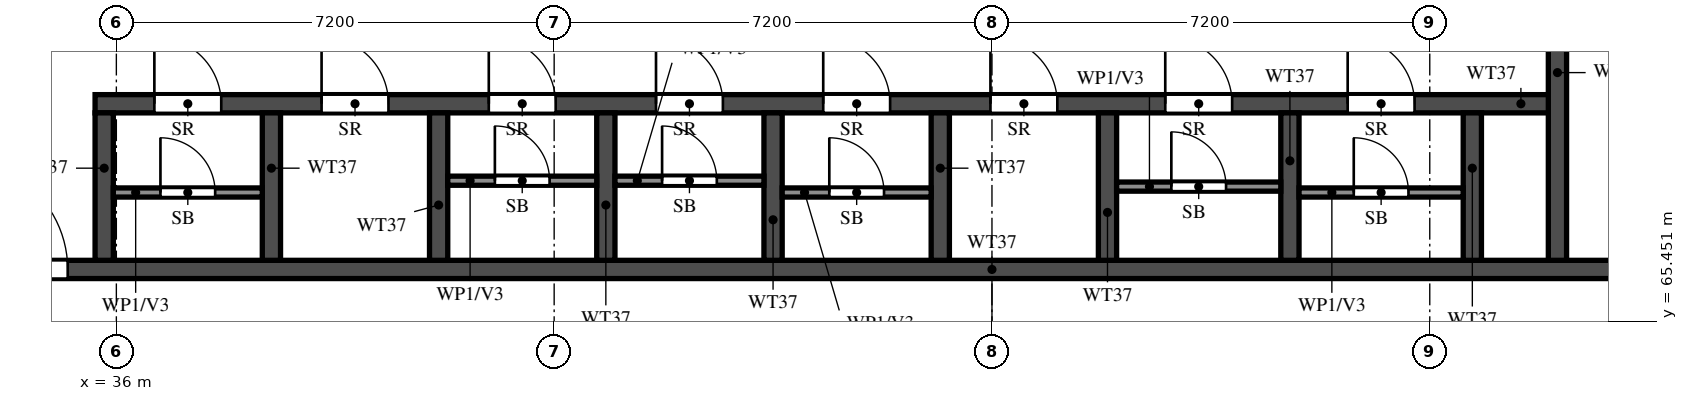
"""IFC4 building model, lengths in metres.
Left out: names, types, materials, properties, quantities, classifications, styles, units other than length and angle.
Written with IfcOpenShell. Run it as: python <this file> out.ifc"""

import sys

from ifc_helpers import new_model, si_unit, direction, frame, frame_2d, origin, place, context, subcontext, project, spatial, rectangle, extrude, element, fill, save


model = new_model("IFC4")
c1 = context("Model", 3, precision=1e-05, world=origin(), true_north=direction((0.0, 1.0)))
c2 = subcontext(c1, "Body", "Model", "MODEL_VIEW")
j1 = project(units=[si_unit("LENGTHUNIT", "METRE"), si_unit("PLANEANGLEUNIT", "RADIAN")], contexts=[c1])
p1 = place(None, origin())
s1 = spatial("IfcSite", under=j1, at=p1, CompositionType="ELEMENT")
p2 = place(p1, origin())
s2 = spatial("IfcBuilding", under=s1, at=p2, CompositionType="ELEMENT")
p3 = place(p2, frame((0.0, 0.0, 264.0)))
s3 = spatial("IfcBuildingStorey", under=s2, at=p3, CompositionType="ELEMENT", Elevation=264.0)
p4 = place(p3, frame((29.2, 66.3, 0.0), z_axis=(0.0, 0.0, 1.0), x_axis=(1.0, 0.0, 0.0)))
e1 = element("IfcWall", 1, at=p4, inside=s3, PredefinedType="SHEAR", context=c2, shape_type="SweptSolid", body=[
    extrude(rectangle(XDim=42.4, YDim=0.3, at=frame_2d((21.2, 0.0))), origin(), (0.0, 0.0, 1.0), 3.22),
])
p5 = place(p4, frame((1.425, 0.0, 0.0)))
e2 = element("IfcOpeningElement", 2, at=p5, cuts=e1, PredefinedType="OPENING", context=c2, shape_type="SweptSolid", body=[
    extrude(rectangle(XDim=1.1, YDim=2.1, at=frame_2d((0.55, 1.05))), frame((0.0, 0.16, 0.0), z_axis=(0.0, -1.0, 0.0), x_axis=(1.0, 0.0, 0.0)), (0.0, 0.0, 1.0), 0.32),
])
p6 = place(p4, frame((4.2, 0.0, 0.0)))
e3 = element("IfcOpeningElement", 3, at=p6, cuts=e1, PredefinedType="OPENING", context=c2, shape_type="SweptSolid", body=[
    extrude(rectangle(XDim=1.8, YDim=2.1, at=frame_2d((0.9, 1.05))), frame((0.0, 0.16, 0.0), z_axis=(0.0, -1.0, 0.0), x_axis=(1.0, 0.0, 0.0)), (0.0, 0.0, 1.0), 0.32),
])
p7 = place(p3, frame((35.65, 69.025, 0.0), z_axis=(0.0, 0.0, 1.0), x_axis=(1.0, 0.0, 0.0)))
e4 = element("IfcWall", 4, at=p7, inside=s3, PredefinedType="SHEAR", context=c2, shape_type="SweptSolid", body=[
    extrude(rectangle(XDim=24.05, YDim=0.3, at=frame_2d((12.025, 0.0))), origin(), (0.0, 0.0, 1.0), 3.22),
])
p8 = place(p7, frame((0.975, 0.0, 0.0)))
e5 = element("IfcOpeningElement", 5, at=p8, cuts=e4, PredefinedType="OPENING", context=c2, shape_type="SweptSolid", body=[
    extrude(rectangle(XDim=1.1, YDim=2.1, at=frame_2d((0.55, 1.05))), frame((0.0, 0.16, 0.0), z_axis=(0.0, -1.0, 0.0), x_axis=(1.0, 0.0, 0.0)), (0.0, 0.0, 1.0), 0.32),
])
p9 = place(p7, frame((3.725, 0.0, 0.0)))
e6 = element("IfcOpeningElement", 6, at=p9, cuts=e4, PredefinedType="OPENING", context=c2, shape_type="SweptSolid", body=[
    extrude(rectangle(XDim=1.1, YDim=2.1, at=frame_2d((0.55, 1.05))), frame((0.0, 0.16, 0.0), z_axis=(0.0, -1.0, 0.0), x_axis=(1.0, 0.0, 0.0)), (0.0, 0.0, 1.0), 0.32),
])
p10 = place(p7, frame((6.475, 0.0, 0.0)))
e7 = element("IfcOpeningElement", 7, at=p10, cuts=e4, PredefinedType="OPENING", context=c2, shape_type="SweptSolid", body=[
    extrude(rectangle(XDim=1.1, YDim=2.1, at=frame_2d((0.55, 1.05))), frame((0.0, 0.16, 0.0), z_axis=(0.0, -1.0, 0.0), x_axis=(1.0, 0.0, 0.0)), (0.0, 0.0, 1.0), 0.32),
])
p11 = place(p7, frame((9.225, 0.0, 0.0)))
e8 = element("IfcOpeningElement", 8, at=p11, cuts=e4, PredefinedType="OPENING", context=c2, shape_type="SweptSolid", body=[
    extrude(rectangle(XDim=1.1, YDim=2.1, at=frame_2d((0.55, 1.05))), frame((0.0, 0.16, 0.0), z_axis=(0.0, -1.0, 0.0), x_axis=(1.0, 0.0, 0.0)), (0.0, 0.0, 1.0), 0.32),
])
p12 = place(p7, frame((11.975, 0.0, 0.0)))
e9 = element("IfcOpeningElement", 9, at=p12, cuts=e4, PredefinedType="OPENING", context=c2, shape_type="SweptSolid", body=[
    extrude(rectangle(XDim=1.1, YDim=2.1, at=frame_2d((0.55, 1.05))), frame((0.0, 0.16, 0.0), z_axis=(0.0, -1.0, 0.0), x_axis=(1.0, 0.0, 0.0)), (0.0, 0.0, 1.0), 0.32),
])
p13 = place(p7, frame((14.725, 0.0, 0.0)))
e10 = element("IfcOpeningElement", 10, at=p13, cuts=e4, PredefinedType="OPENING", context=c2, shape_type="SweptSolid", body=[
    extrude(rectangle(XDim=1.1, YDim=2.1, at=frame_2d((0.55, 1.05))), frame((0.0, 0.16, 0.0), z_axis=(0.0, -1.0, 0.0), x_axis=(1.0, 0.0, 0.0)), (0.0, 0.0, 1.0), 0.32),
])
p14 = place(p7, frame((17.6, 0.0, 0.0)))
e11 = element("IfcOpeningElement", 11, at=p14, cuts=e4, PredefinedType="OPENING", context=c2, shape_type="SweptSolid", body=[
    extrude(rectangle(XDim=1.1, YDim=2.1, at=frame_2d((0.55, 1.05))), frame((0.0, 0.16, 0.0), z_axis=(0.0, -1.0, 0.0), x_axis=(1.0, 0.0, 0.0)), (0.0, 0.0, 1.0), 0.32),
])
p15 = place(p7, frame((20.6, 0.0, 0.0)))
e12 = element("IfcOpeningElement", 12, at=p15, cuts=e4, PredefinedType="OPENING", context=c2, shape_type="SweptSolid", body=[
    extrude(rectangle(XDim=1.1, YDim=2.1, at=frame_2d((0.55, 1.05))), frame((0.0, 0.16, 0.0), z_axis=(0.0, -1.0, 0.0), x_axis=(1.0, 0.0, 0.0)), (0.0, 0.0, 1.0), 0.32),
])
p16 = place(p3, frame((59.7, 66.45, 0.0), z_axis=(0.0, 0.0, 1.0), x_axis=(0.0, 1.0, 0.0)))
e13 = element("IfcWall", 13, at=p16, inside=s3, PredefinedType="SHEAR", context=c2, shape_type="SweptSolid", body=[
    extrude(rectangle(XDim=6.175, YDim=0.3, at=frame_2d((3.087, 0.0))), origin(), (0.0, 0.0, 1.0), 3.22),
])
p17 = place(p16, frame((3.85, 0.0, 0.0)))
e14 = element("IfcOpeningElement", 14, at=p17, cuts=e13, PredefinedType="OPENING", context=c2, shape_type="SweptSolid", body=[
    extrude(rectangle(XDim=1.2, YDim=2.1, at=frame_2d((0.6, 1.05))), frame((0.0, 0.16, 0.0), z_axis=(0.0, -1.0, 0.0), x_axis=(1.0, 0.0, 0.0)), (0.0, 0.0, 1.0), 0.32),
])
for number, where, z_axis, x_axis in (
    (15, (35.8, 66.45, 0.0), (0.0, 0.0, 1.0), (0.0, 1.0, 0.0)),
    (16, (38.55, 66.45, 0.0), (0.0, 0.0, 1.0), (0.0, 1.0, 0.0)),
    (17, (41.3, 66.45, 0.0), (0.0, 0.0, 1.0), (0.0, 1.0, 0.0)),
    (18, (44.05, 66.45, 0.0), (0.0, 0.0, 1.0), (0.0, 1.0, 0.0)),
    (19, (46.8, 66.45, 0.0), (0.0, 0.0, 1.0), (0.0, 1.0, 0.0)),
    (20, (49.55, 66.45, 0.0), (0.0, 0.0, 1.0), (0.0, 1.0, 0.0)),
    (21, (52.3, 66.45, 0.0), (0.0, 0.0, 1.0), (0.0, 1.0, 0.0)),
    (22, (55.3, 66.45, 0.0), (0.0, 0.0, 1.0), (0.0, 1.0, 0.0)),
    (23, (58.3, 66.45, 0.0), (0.0, 0.0, 1.0), (0.0, 1.0, 0.0)),
):
    element("IfcWall", number, at=place(p3, frame(where, z_axis=z_axis, x_axis=x_axis)), inside=s3, PredefinedType="SHEAR", context=c2, shape_type="SweptSolid", body=[
        extrude(rectangle(XDim=2.425, YDim=0.3, at=frame_2d((1.212, 0.0))), origin(), (0.0, 0.0, 1.0), 3.22),
    ])
p18 = place(p3, frame((35.95, 67.565, 0.0), z_axis=(0.0, 0.0, 1.0), x_axis=(1.0, 0.0, 0.0)))
e24 = element("IfcWall", 24, at=p18, inside=s3, PredefinedType="PARTITIONING", context=c2, shape_type="SweptSolid", body=[
    extrude(rectangle(XDim=2.45, YDim=0.15, at=frame_2d((1.225, 0.0))), origin(), (0.0, 0.0, 1.0), 3.22),
])
p19 = place(p18, frame((0.775, 0.0, 0.0)))
e25 = element("IfcOpeningElement", 25, at=p19, cuts=e24, PredefinedType="OPENING", context=c2, shape_type="SweptSolid", body=[
    extrude(rectangle(XDim=0.9, YDim=2.1, at=frame_2d((0.45, 1.05))), frame((0.0, 0.085, 0.0), z_axis=(0.0, -1.0, 0.0), x_axis=(1.0, 0.0, 0.0)), (0.0, 0.0, 1.0), 0.17),
])
p20 = place(p3, frame((41.45, 67.76, 0.0), z_axis=(0.0, 0.0, 1.0), x_axis=(1.0, 0.0, 0.0)))
e26 = element("IfcWall", 26, at=p20, inside=s3, PredefinedType="PARTITIONING", context=c2, shape_type="SweptSolid", body=[
    extrude(rectangle(XDim=2.45, YDim=0.15, at=frame_2d((1.225, 0.0))), origin(), (0.0, 0.0, 1.0), 3.22),
])
p21 = place(p20, frame((0.775, 0.0, 0.0)))
e27 = element("IfcOpeningElement", 27, at=p21, cuts=e26, PredefinedType="OPENING", context=c2, shape_type="SweptSolid", body=[
    extrude(rectangle(XDim=0.9, YDim=2.1, at=frame_2d((0.45, 1.05))), frame((0.0, 0.085, 0.0), z_axis=(0.0, -1.0, 0.0), x_axis=(1.0, 0.0, 0.0)), (0.0, 0.0, 1.0), 0.17),
])
p22 = place(p3, frame((44.2, 67.76, 0.0), z_axis=(0.0, 0.0, 1.0), x_axis=(1.0, 0.0, 0.0)))
e28 = element("IfcWall", 28, at=p22, inside=s3, PredefinedType="PARTITIONING", context=c2, shape_type="SweptSolid", body=[
    extrude(rectangle(XDim=2.45, YDim=0.15, at=frame_2d((1.225, 0.0))), origin(), (0.0, 0.0, 1.0), 3.22),
])
p23 = place(p22, frame((0.775, 0.0, 0.0)))
e29 = element("IfcOpeningElement", 29, at=p23, cuts=e28, PredefinedType="OPENING", context=c2, shape_type="SweptSolid", body=[
    extrude(rectangle(XDim=0.9, YDim=2.1, at=frame_2d((0.45, 1.05))), frame((0.0, 0.085, 0.0), z_axis=(0.0, -1.0, 0.0), x_axis=(1.0, 0.0, 0.0)), (0.0, 0.0, 1.0), 0.17),
])
p24 = place(p3, frame((46.95, 67.565, 0.0), z_axis=(0.0, 0.0, 1.0), x_axis=(1.0, 0.0, 0.0)))
e30 = element("IfcWall", 30, at=p24, inside=s3, PredefinedType="PARTITIONING", context=c2, shape_type="SweptSolid", body=[
    extrude(rectangle(XDim=2.45, YDim=0.15, at=frame_2d((1.225, 0.0))), origin(), (0.0, 0.0, 1.0), 3.22),
])
p25 = place(p24, frame((0.775, 0.0, 0.0)))
e31 = element("IfcOpeningElement", 31, at=p25, cuts=e30, PredefinedType="OPENING", context=c2, shape_type="SweptSolid", body=[
    extrude(rectangle(XDim=0.9, YDim=2.1, at=frame_2d((0.45, 1.05))), frame((0.0, 0.085, 0.0), z_axis=(0.0, -1.0, 0.0), x_axis=(1.0, 0.0, 0.0)), (0.0, 0.0, 1.0), 0.17),
])
p26 = place(p3, frame((52.45, 67.663, 0.0), z_axis=(0.0, 0.0, 1.0), x_axis=(1.0, 0.0, 0.0)))
e32 = element("IfcWall", 32, at=p26, inside=s3, PredefinedType="PARTITIONING", context=c2, shape_type="SweptSolid", body=[
    extrude(rectangle(XDim=2.7, YDim=0.15, at=frame_2d((1.35, 0.0))), origin(), (0.0, 0.0, 1.0), 3.22),
])
p27 = place(p26, frame((0.9, 0.0, 0.0)))
e33 = element("IfcOpeningElement", 33, at=p27, cuts=e32, PredefinedType="OPENING", context=c2, shape_type="SweptSolid", body=[
    extrude(rectangle(XDim=0.9, YDim=2.1, at=frame_2d((0.45, 1.05))), frame((0.0, 0.085, 0.0), z_axis=(0.0, -1.0, 0.0), x_axis=(1.0, 0.0, 0.0)), (0.0, 0.0, 1.0), 0.17),
])
p28 = place(p3, frame((55.45, 67.565, 0.0), z_axis=(0.0, 0.0, 1.0), x_axis=(1.0, 0.0, 0.0)))
e34 = element("IfcWall", 34, at=p28, inside=s3, PredefinedType="PARTITIONING", context=c2, shape_type="SweptSolid", body=[
    extrude(rectangle(XDim=2.7, YDim=0.15, at=frame_2d((1.35, 0.0))), origin(), (0.0, 0.0, 1.0), 3.22),
])
p29 = place(p28, frame((0.9, 0.0, 0.0)))
e35 = element("IfcOpeningElement", 35, at=p29, cuts=e34, PredefinedType="OPENING", context=c2, shape_type="SweptSolid", body=[
    extrude(rectangle(XDim=0.9, YDim=2.1, at=frame_2d((0.45, 1.05))), frame((0.0, 0.085, 0.0), z_axis=(0.0, -1.0, 0.0), x_axis=(1.0, 0.0, 0.0)), (0.0, 0.0, 1.0), 0.17),
])
p30 = place(p6, origin())
e36 = element("IfcDoor", 36, at=p30, inside=s3, OperationType="DOUBLE_DOOR_SINGLE_SWING", PredefinedType="DOOR", context=c2, shape_type="SweptSolid", body=[
    extrude(rectangle(XDim=1.8, YDim=2.1, at=frame_2d((0.9, 1.05))), frame((0.0, 0.025, 0.0), z_axis=(0.0, -1.0, 0.0), x_axis=(1.0, 0.0, 0.0)), (0.0, 0.0, 1.0), 0.05),
])
fill(e3, e36)
p31 = place(p8, origin())
e37 = element("IfcDoor", 37, at=p31, inside=s3, OperationType="SINGLE_SWING_RIGHT", PredefinedType="DOOR", context=c2, shape_type="SweptSolid", body=[
    extrude(rectangle(XDim=1.1, YDim=2.1, at=frame_2d((0.55, 1.05))), frame((0.0, 0.025, 0.0), z_axis=(0.0, -1.0, 0.0), x_axis=(1.0, 0.0, 0.0)), (0.0, 0.0, 1.0), 0.05),
])
fill(e5, e37)
p32 = place(p19, origin())
e38 = element("IfcDoor", 38, at=p32, inside=s3, OperationType="SINGLE_SWING_RIGHT", PredefinedType="DOOR", context=c2, shape_type="SweptSolid", body=[
    extrude(rectangle(XDim=0.9, YDim=2.1, at=frame_2d((0.45, 1.05))), frame((0.0, 0.025, 0.0), z_axis=(0.0, -1.0, 0.0), x_axis=(1.0, 0.0, 0.0)), (0.0, 0.0, 1.0), 0.05),
])
fill(e25, e38)
p33 = place(p9, origin())
e39 = element("IfcDoor", 39, at=p33, inside=s3, OperationType="SINGLE_SWING_LEFT", PredefinedType="DOOR", context=c2, shape_type="SweptSolid", body=[
    extrude(rectangle(XDim=1.1, YDim=2.1, at=frame_2d((0.55, 1.05))), frame((0.0, 0.025, 0.0), z_axis=(0.0, -1.0, 0.0), x_axis=(1.0, 0.0, 0.0)), (0.0, 0.0, 1.0), 0.05),
])
fill(e6, e39)
p34 = place(p10, origin())
e40 = element("IfcDoor", 40, at=p34, inside=s3, OperationType="SINGLE_SWING_RIGHT", PredefinedType="DOOR", context=c2, shape_type="SweptSolid", body=[
    extrude(rectangle(XDim=1.1, YDim=2.1, at=frame_2d((0.55, 1.05))), frame((0.0, 0.025, 0.0), z_axis=(0.0, -1.0, 0.0), x_axis=(1.0, 0.0, 0.0)), (0.0, 0.0, 1.0), 0.05),
])
fill(e7, e40)
p35 = place(p21, origin())
e41 = element("IfcDoor", 41, at=p35, inside=s3, OperationType="SINGLE_SWING_LEFT", PredefinedType="DOOR", context=c2, shape_type="SweptSolid", body=[
    extrude(rectangle(XDim=0.9, YDim=2.1, at=frame_2d((0.45, 1.05))), frame((0.0, 0.025, 0.0), z_axis=(0.0, -1.0, 0.0), x_axis=(1.0, 0.0, 0.0)), (0.0, 0.0, 1.0), 0.05),
])
fill(e27, e41)
p36 = place(p11, origin())
e42 = element("IfcDoor", 42, at=p36, inside=s3, OperationType="SINGLE_SWING_LEFT", PredefinedType="DOOR", context=c2, shape_type="SweptSolid", body=[
    extrude(rectangle(XDim=1.1, YDim=2.1, at=frame_2d((0.55, 1.05))), frame((0.0, 0.025, 0.0), z_axis=(0.0, -1.0, 0.0), x_axis=(1.0, 0.0, 0.0)), (0.0, 0.0, 1.0), 0.05),
])
fill(e8, e42)
p37 = place(p23, origin())
e43 = element("IfcDoor", 43, at=p37, inside=s3, OperationType="SINGLE_SWING_RIGHT", PredefinedType="DOOR", context=c2, shape_type="SweptSolid", body=[
    extrude(rectangle(XDim=0.9, YDim=2.1, at=frame_2d((0.45, 1.05))), frame((0.0, 0.025, 0.0), z_axis=(0.0, -1.0, 0.0), x_axis=(1.0, 0.0, 0.0)), (0.0, 0.0, 1.0), 0.05),
])
fill(e29, e43)
p38 = place(p12, origin())
e44 = element("IfcDoor", 44, at=p38, inside=s3, OperationType="SINGLE_SWING_RIGHT", PredefinedType="DOOR", context=c2, shape_type="SweptSolid", body=[
    extrude(rectangle(XDim=1.1, YDim=2.1, at=frame_2d((0.55, 1.05))), frame((0.0, 0.025, 0.0), z_axis=(0.0, -1.0, 0.0), x_axis=(1.0, 0.0, 0.0)), (0.0, 0.0, 1.0), 0.05),
])
fill(e9, e44)
p39 = place(p25, origin())
e45 = element("IfcDoor", 45, at=p39, inside=s3, OperationType="SINGLE_SWING_RIGHT", PredefinedType="DOOR", context=c2, shape_type="SweptSolid", body=[
    extrude(rectangle(XDim=0.9, YDim=2.1, at=frame_2d((0.45, 1.05))), frame((0.0, 0.025, 0.0), z_axis=(0.0, -1.0, 0.0), x_axis=(1.0, 0.0, 0.0)), (0.0, 0.0, 1.0), 0.05),
])
fill(e31, e45)
p40 = place(p13, origin())
e46 = element("IfcDoor", 46, at=p40, inside=s3, OperationType="SINGLE_SWING_LEFT", PredefinedType="DOOR", context=c2, shape_type="SweptSolid", body=[
    extrude(rectangle(XDim=1.1, YDim=2.1, at=frame_2d((0.55, 1.05))), frame((0.0, 0.025, 0.0), z_axis=(0.0, -1.0, 0.0), x_axis=(1.0, 0.0, 0.0)), (0.0, 0.0, 1.0), 0.05),
])
fill(e10, e46)
p41 = place(p14, origin())
e47 = element("IfcDoor", 47, at=p41, inside=s3, OperationType="SINGLE_SWING_RIGHT", PredefinedType="DOOR", context=c2, shape_type="SweptSolid", body=[
    extrude(rectangle(XDim=1.1, YDim=2.1, at=frame_2d((0.55, 1.05))), frame((0.0, 0.025, 0.0), z_axis=(0.0, -1.0, 0.0), x_axis=(1.0, 0.0, 0.0)), (0.0, 0.0, 1.0), 0.05),
])
fill(e11, e47)
p42 = place(p27, origin())
e48 = element("IfcDoor", 48, at=p42, inside=s3, OperationType="SINGLE_SWING_LEFT", PredefinedType="DOOR", context=c2, shape_type="SweptSolid", body=[
    extrude(rectangle(XDim=0.9, YDim=2.1, at=frame_2d((0.45, 1.05))), frame((0.0, 0.025, 0.0), z_axis=(0.0, -1.0, 0.0), x_axis=(1.0, 0.0, 0.0)), (0.0, 0.0, 1.0), 0.05),
])
fill(e33, e48)
p43 = place(p15, origin())
e49 = element("IfcDoor", 49, at=p43, inside=s3, OperationType="SINGLE_SWING_RIGHT", PredefinedType="DOOR", context=c2, shape_type="SweptSolid", body=[
    extrude(rectangle(XDim=1.1, YDim=2.1, at=frame_2d((0.55, 1.05))), frame((0.0, 0.025, 0.0), z_axis=(0.0, -1.0, 0.0), x_axis=(1.0, 0.0, 0.0)), (0.0, 0.0, 1.0), 0.05),
])
fill(e12, e49)
p44 = place(p29, origin())
e50 = element("IfcDoor", 50, at=p44, inside=s3, OperationType="SINGLE_SWING_RIGHT", PredefinedType="DOOR", context=c2, shape_type="SweptSolid", body=[
    extrude(rectangle(XDim=0.9, YDim=2.1, at=frame_2d((0.45, 1.05))), frame((0.0, 0.025, 0.0), z_axis=(0.0, -1.0, 0.0), x_axis=(1.0, 0.0, 0.0)), (0.0, 0.0, 1.0), 0.05),
])
fill(e35, e50)
save(model, sys.argv[1])
